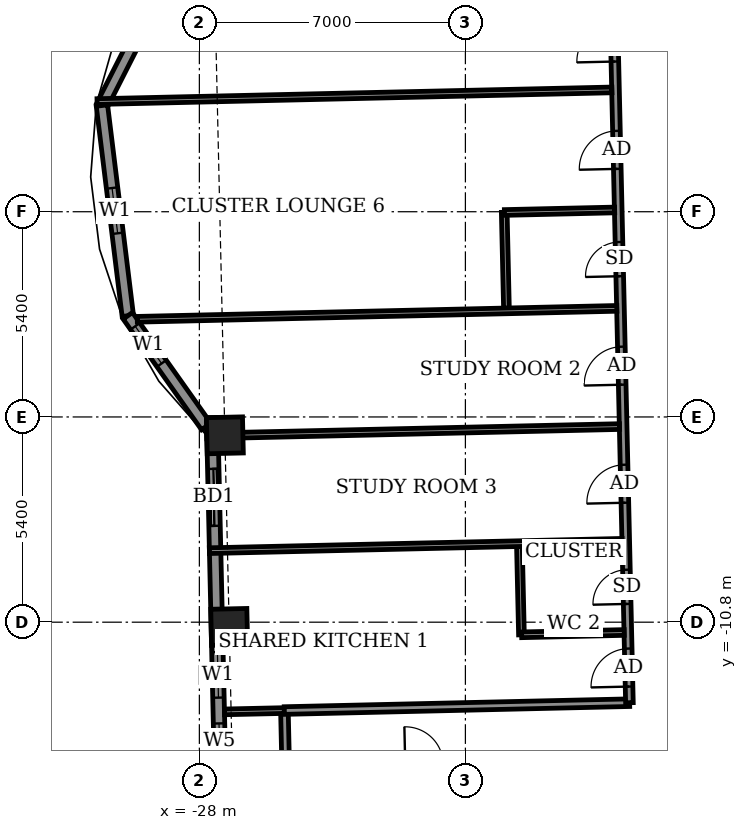
"""IFC4 building model, lengths in metres.
Left out: names, types, materials, properties, quantities, classifications, styles, units other than length and angle.
Written with IfcOpenShell. Run it as: python <this file> out.ifc"""

import sys

from ifc_helpers import new_model, si_unit, direction, frame, frame_2d, origin, origin_2d, place, context, subcontext, project, spatial, rectangle, extrude, element, fill, save


model = new_model("IFC4")
c1 = context("Model", 3, precision=1e-05, world=origin(), true_north=direction((0.0, 1.0)))
c2 = subcontext(c1, "Body", "Model", "MODEL_VIEW")
j1 = project(units=[si_unit("LENGTHUNIT", "METRE"), si_unit("PLANEANGLEUNIT", "RADIAN")], contexts=[c1])
p1 = place(None, origin())
s1 = spatial("IfcSite", under=j1, at=p1, CompositionType="ELEMENT")
p2 = place(p1, origin())
s2 = spatial("IfcBuilding", under=s1, at=p2, CompositionType="ELEMENT")
p3 = place(p2, frame((0.0, 0.0, 287.1)))
s3 = spatial("IfcBuildingStorey", under=s2, at=p3, CompositionType="ELEMENT", Elevation=287.1)
for number, where, z_axis, x_axis in (
    (1, (-27.329, -5.883, -0.55), (0.0, 0.0, 1.0), (0.023, -1.0, 0.0)),
    (2, (-27.215, -10.924, -0.55), (0.0, 0.0, 1.0), (0.023, -1.0, 0.0)),
):
    element("IfcColumn", number, at=place(p3, frame(where, z_axis=z_axis, x_axis=x_axis)), inside=s3, PredefinedType="COLUMN", context=c2, shape_type="SweptSolid", body=[
        extrude(rectangle(XDim=0.95, YDim=0.95, at=origin_2d()), origin(), (0.0, 0.0, 1.0), 3.6),
    ])
p4 = place(p3, frame((-28.12, 7.608, 0.0), z_axis=(0.0, 0.0, 1.0), x_axis=(-0.45266802131, -0.891679125293, 0.0)))
e3 = element("IfcWall", 3, at=p4, inside=s3, PredefinedType="SOLIDWALL", context=c2, shape_type="SweptSolid", body=[
    extrude(rectangle(XDim=5.399, YDim=0.3, at=frame_2d((2.699, 0.0))), origin(), (0.0, 0.0, 1.0), 3.05),
])
p5 = place(p4, frame((2.008, 0.0, 0.9)))
e4 = element("IfcOpeningElement", 4, at=p5, cuts=e3, PredefinedType="OPENING", context=c2, shape_type="SweptSolid", body=[
    extrude(rectangle(XDim=1.2, YDim=1.5, at=frame_2d((0.6, 0.75))), frame((0.0, 0.16, 0.0), z_axis=(0.0, -1.0, 0.0), x_axis=(1.0, 0.0, 0.0)), (0.0, 0.0, 1.0), 0.32),
])
p6 = place(p3, frame((-30.564, 2.794, 0.0), z_axis=(0.0, 0.0, 1.0), x_axis=(0.122163831021, -0.992509948761, 0.0)))
e5 = element("IfcWall", 5, at=p6, inside=s3, PredefinedType="SOLIDWALL", context=c2, shape_type="SweptSolid", body=[
    extrude(rectangle(XDim=5.574, YDim=0.3, at=frame_2d((2.787, 0.0))), origin(), (0.0, 0.0, 1.0), 3.05),
])
p7 = place(p6, frame((2.187, 0.0, 0.9)))
e6 = element("IfcOpeningElement", 6, at=p7, cuts=e5, PredefinedType="OPENING", context=c2, shape_type="SweptSolid", body=[
    extrude(rectangle(XDim=1.2, YDim=1.5, at=frame_2d((0.6, 0.75))), frame((0.0, 0.16, 0.0), z_axis=(0.0, -1.0, 0.0), x_axis=(1.0, 0.0, 0.0)), (0.0, 0.0, 1.0), 0.32),
])
p8 = place(p3, frame((-29.883, -2.738, 0.0), z_axis=(0.0, 0.0, 1.0), x_axis=(0.578095163598, -0.815969351033, 0.0)))
e7 = element("IfcWall", 7, at=p8, inside=s3, PredefinedType="SOLIDWALL", context=c2, shape_type="SweptSolid", body=[
    extrude(rectangle(XDim=3.569, YDim=0.3, at=frame_2d((1.784, 0.0))), origin(), (0.0, 0.0, 1.0), 3.05),
])
p9 = place(p8, frame((0.338, 0.0, 0.9)))
e8 = element("IfcOpeningElement", 8, at=p9, cuts=e7, PredefinedType="OPENING", context=c2, shape_type="SweptSolid", body=[
    extrude(rectangle(XDim=1.2, YDim=1.5, at=frame_2d((0.6, 0.75))), frame((0.0, 0.16, 0.0), z_axis=(0.0, -1.0, 0.0), x_axis=(1.0, 0.0, 0.0)), (0.0, 0.0, 1.0), 0.32),
])
p10 = place(p3, frame((-27.665, -5.416, 0.0), z_axis=(0.0, 0.0, 1.0), x_axis=(0.022660024814, -0.999743228672, 0.0)))
e9 = element("IfcWall", 9, at=p10, inside=s3, PredefinedType="SOLIDWALL", context=c2, shape_type="SweptSolid", body=[
    extrude(rectangle(XDim=15.45, YDim=0.3, at=frame_2d((7.725, 0.0))), origin(), (0.0, 0.0, 1.0), 2.55),
])
p11 = place(p10, frame((1.35, 0.0, 0.0)))
e10 = element("IfcOpeningElement", 10, at=p11, cuts=e9, PredefinedType="OPENING", context=c2, shape_type="SweptSolid", body=[
    extrude(rectangle(XDim=1.5, YDim=2.4, at=frame_2d((0.75, 1.2))), frame((0.0, 0.16, 0.0), z_axis=(0.0, -1.0, 0.0), x_axis=(1.0, 0.0, 0.0)), (0.0, 0.0, 1.0), 0.32),
])
p12 = place(p10, frame((6.171, 0.0, 0.9)))
e11 = element("IfcOpeningElement", 11, at=p12, cuts=e9, PredefinedType="OPENING", context=c2, shape_type="SweptSolid", body=[
    extrude(rectangle(XDim=1.2, YDim=1.5, at=frame_2d((0.6, 0.75))), frame((0.0, 0.16, 0.0), z_axis=(0.0, -1.0, 0.0), x_axis=(1.0, 0.0, 0.0)), (0.0, 0.0, 1.0), 0.32),
])
p13 = place(p10, frame((8.05, 0.0, 0.9)))
e12 = element("IfcOpeningElement", 12, at=p13, cuts=e9, PredefinedType="OPENING", context=c2, shape_type="SweptSolid", body=[
    extrude(rectangle(XDim=0.9, YDim=1.5, at=frame_2d((0.45, 0.75))), frame((0.0, 0.16, 0.0), z_axis=(0.0, -1.0, 0.0), x_axis=(1.0, 0.0, 0.0)), (0.0, 0.0, 1.0), 0.32),
])
p14 = place(p10, frame((11.625, 0.0, 0.9)))
e13 = element("IfcOpeningElement", 13, at=p14, cuts=e9, PredefinedType="OPENING", context=c2, shape_type="SweptSolid", body=[
    extrude(rectangle(XDim=2.4, YDim=1.5, at=frame_2d((1.2, 0.75))), frame((0.0, 0.16, 0.0), z_axis=(0.0, -1.0, 0.0), x_axis=(1.0, 0.0, 0.0)), (0.0, 0.0, 1.0), 0.32),
])
p15 = place(p3, frame((-25.731, -14.624, 0.0), z_axis=(0.0, 0.0, 1.0), x_axis=(0.999742799525, 0.022678950563, 0.0)))
e14 = element("IfcWall", 14, at=p15, inside=s3, PredefinedType="PARTITIONING", context=c2, shape_type="SweptSolid", body=[
    extrude(rectangle(XDim=55.386, YDim=0.2, at=frame_2d((27.693, 0.0))), origin(), (0.0, 0.0, 1.0), 3.05),
])
p16 = place(p15, frame((3.149, 0.0, 0.0)))
e15 = element("IfcOpeningElement", 15, at=p16, cuts=e14, PredefinedType="OPENING", context=c2, shape_type="SweptSolid", body=[
    extrude(rectangle(XDim=1.0, YDim=2.1, at=frame_2d((0.5, 1.05))), frame((0.0, 0.11, 0.0), z_axis=(0.0, -1.0, 0.0), x_axis=(1.0, 0.0, 0.0)), (0.0, 0.0, 1.0), 0.22),
])
p17 = place(p15, frame((11.1, 0.0, 0.0)))
e16 = element("IfcOpeningElement", 16, at=p17, cuts=e14, PredefinedType="OPENING", context=c2, shape_type="SweptSolid", body=[
    extrude(rectangle(XDim=0.9, YDim=2.1, at=frame_2d((0.45, 1.05))), frame((0.0, 0.11, 0.0), z_axis=(0.0, -1.0, 0.0), x_axis=(1.0, 0.0, 0.0)), (0.0, 0.0, 1.0), 0.22),
])
p18 = place(p15, frame((12.95, 0.0, 0.0)))
e17 = element("IfcOpeningElement", 17, at=p18, cuts=e14, PredefinedType="OPENING", context=c2, shape_type="SweptSolid", body=[
    extrude(rectangle(XDim=0.9, YDim=2.1, at=frame_2d((0.45, 1.05))), frame((0.0, 0.11, 0.0), z_axis=(0.0, -1.0, 0.0), x_axis=(1.0, 0.0, 0.0)), (0.0, 0.0, 1.0), 0.22),
])
p19 = place(p15, frame((19.675, 0.0, 0.0)))
e18 = element("IfcOpeningElement", 18, at=p19, cuts=e14, PredefinedType="OPENING", context=c2, shape_type="SweptSolid", body=[
    extrude(rectangle(XDim=0.9, YDim=2.1, at=frame_2d((0.45, 1.05))), frame((0.0, 0.11, 0.0), z_axis=(0.0, -1.0, 0.0), x_axis=(1.0, 0.0, 0.0)), (0.0, 0.0, 1.0), 0.22),
])
p20 = place(p15, frame((21.7, 0.0, 0.0)))
e19 = element("IfcOpeningElement", 19, at=p20, cuts=e14, PredefinedType="OPENING", context=c2, shape_type="SweptSolid", body=[
    extrude(rectangle(XDim=0.9, YDim=2.1, at=frame_2d((0.45, 1.05))), frame((0.0, 0.11, 0.0), z_axis=(0.0, -1.0, 0.0), x_axis=(1.0, 0.0, 0.0)), (0.0, 0.0, 1.0), 0.22),
])
p21 = place(p15, frame((28.475, 0.0, 0.0)))
e20 = element("IfcOpeningElement", 20, at=p21, cuts=e14, PredefinedType="OPENING", context=c2, shape_type="SweptSolid", body=[
    extrude(rectangle(XDim=0.9, YDim=2.1, at=frame_2d((0.45, 1.05))), frame((0.0, 0.11, 0.0), z_axis=(0.0, -1.0, 0.0), x_axis=(1.0, 0.0, 0.0)), (0.0, 0.0, 1.0), 0.22),
])
p22 = place(p15, frame((30.45, 0.0, 0.0)))
e21 = element("IfcOpeningElement", 21, at=p22, cuts=e14, PredefinedType="OPENING", context=c2, shape_type="SweptSolid", body=[
    extrude(rectangle(XDim=0.9, YDim=2.1, at=frame_2d((0.45, 1.05))), frame((0.0, 0.11, 0.0), z_axis=(0.0, -1.0, 0.0), x_axis=(1.0, 0.0, 0.0)), (0.0, 0.0, 1.0), 0.22),
])
p23 = place(p15, frame((37.25, 0.0, 0.0)))
e22 = element("IfcOpeningElement", 22, at=p23, cuts=e14, PredefinedType="OPENING", context=c2, shape_type="SweptSolid", body=[
    extrude(rectangle(XDim=0.9, YDim=2.1, at=frame_2d((0.45, 1.05))), frame((0.0, 0.11, 0.0), z_axis=(0.0, -1.0, 0.0), x_axis=(1.0, 0.0, 0.0)), (0.0, 0.0, 1.0), 0.22),
])
p24 = place(p15, frame((39.175, 0.0, 0.0)))
e23 = element("IfcOpeningElement", 23, at=p24, cuts=e14, PredefinedType="OPENING", context=c2, shape_type="SweptSolid", body=[
    extrude(rectangle(XDim=0.9, YDim=2.1, at=frame_2d((0.45, 1.05))), frame((0.0, 0.11, 0.0), z_axis=(0.0, -1.0, 0.0), x_axis=(1.0, 0.0, 0.0)), (0.0, 0.0, 1.0), 0.22),
])
p25 = place(p15, frame((45.875, 0.0, 0.0)))
e24 = element("IfcOpeningElement", 24, at=p25, cuts=e14, PredefinedType="OPENING", context=c2, shape_type="SweptSolid", body=[
    extrude(rectangle(XDim=0.9, YDim=2.1, at=frame_2d((0.45, 1.05))), frame((0.0, 0.11, 0.0), z_axis=(0.0, -1.0, 0.0), x_axis=(1.0, 0.0, 0.0)), (0.0, 0.0, 1.0), 0.22),
])
p26 = place(p15, frame((51.127, 0.0, 0.0)))
e25 = element("IfcOpeningElement", 25, at=p26, cuts=e14, PredefinedType="OPENING", context=c2, shape_type="SweptSolid", body=[
    extrude(rectangle(XDim=1.0, YDim=2.1, at=frame_2d((0.5, 1.05))), frame((0.0, 0.11, 0.0), z_axis=(0.0, -1.0, 0.0), x_axis=(1.0, 0.0, 0.0)), (0.0, 0.0, 1.0), 0.22),
])
p27 = place(p3, frame((-25.728, -14.624, 0.0), z_axis=(0.0, 0.0, 1.0), x_axis=(-0.022632637625, 0.99974384905, 0.0)))
e26 = element("IfcWall", 26, at=p27, inside=s3, PredefinedType="PARTITIONING", context=c2, shape_type="SweptSolid", body=[
    extrude(rectangle(XDim=1.5, YDim=0.2, at=frame_2d((0.75, 0.0))), origin(), (0.0, 0.0, 1.0), 3.05),
])
p28 = place(p3, frame((-27.339, -13.16, 0.0), z_axis=(0.0, 0.0, 1.0), x_axis=(0.999754171712, 0.022171967518, 0.0)))
e27 = element("IfcWall", 27, at=p28, inside=s3, PredefinedType="PARTITIONING", context=c2, shape_type="SweptSolid", body=[
    extrude(rectangle(XDim=1.575, YDim=0.15, at=frame_2d((0.787, 0.0))), origin(), (0.0, 0.0, 1.0), 2.55),
])
p29 = place(p3, frame((-25.765, -13.125, 0.0), z_axis=(0.0, 0.0, 1.0), x_axis=(0.999740502457, 0.022779985654, 0.0)))
e28 = element("IfcWall", 28, at=p29, inside=s3, PredefinedType="PARTITIONING", context=c2, shape_type="SweptSolid", body=[
    extrude(rectangle(XDim=9.088, YDim=0.2, at=frame_2d((4.544, 0.0))), origin(), (0.0, 0.0, 1.0), 3.05),
])
p30 = place(p3, frame((-16.684, -12.919, 0.0), z_axis=(0.0, 0.0, 1.0), x_axis=(-0.022712214871, 0.999742044377, 0.0)))
e29 = element("IfcWall", 29, at=p30, inside=s3, PredefinedType="PARTITIONING", context=c2, shape_type="SweptSolid", body=[
    extrude(rectangle(XDim=26.551, YDim=0.2, at=frame_2d((13.275, 0.0))), origin(), (0.0, 0.0, 1.0), 3.05),
])
p31 = place(p30, frame((24.688, 0.0, 0.0)))
e30 = element("IfcOpeningElement", 30, at=p31, cuts=e29, PredefinedType="OPENING", context=c2, shape_type="SweptSolid", body=[
    extrude(rectangle(XDim=1.0, YDim=2.1, at=frame_2d((0.5, 1.05))), frame((0.0, 0.11, 0.0), z_axis=(0.0, -1.0, 0.0), x_axis=(1.0, 0.0, 0.0)), (0.0, 0.0, 1.0), 0.22),
])
p32 = place(p30, frame((21.975, 0.0, 0.0)))
e31 = element("IfcOpeningElement", 31, at=p32, cuts=e29, PredefinedType="OPENING", context=c2, shape_type="SweptSolid", body=[
    extrude(rectangle(XDim=0.9, YDim=2.1, at=frame_2d((0.45, 1.05))), frame((0.0, 0.11, 0.0), z_axis=(0.0, -1.0, 0.0), x_axis=(1.0, 0.0, 0.0)), (0.0, 0.0, 1.0), 0.22),
])
p33 = place(p30, frame((16.875, 0.0, 0.0)))
e32 = element("IfcOpeningElement", 32, at=p33, cuts=e29, PredefinedType="OPENING", context=c2, shape_type="SweptSolid", body=[
    extrude(rectangle(XDim=1.0, YDim=2.1, at=frame_2d((0.5, 1.05))), frame((0.0, 0.11, 0.0), z_axis=(0.0, -1.0, 0.0), x_axis=(1.0, 0.0, 0.0)), (0.0, 0.0, 1.0), 0.22),
])
p34 = place(p30, frame((19.375, 0.0, 0.0)))
e33 = element("IfcOpeningElement", 33, at=p34, cuts=e29, PredefinedType="OPENING", context=c2, shape_type="SweptSolid", body=[
    extrude(rectangle(XDim=0.9, YDim=2.1, at=frame_2d((0.45, 1.05))), frame((0.0, 0.11, 0.0), z_axis=(0.0, -1.0, 0.0), x_axis=(1.0, 0.0, 0.0)), (0.0, 0.0, 1.0), 0.22),
])
p35 = place(p30, frame((14.05, 0.0, 0.0)))
e34 = element("IfcOpeningElement", 34, at=p35, cuts=e29, PredefinedType="OPENING", context=c2, shape_type="SweptSolid", body=[
    extrude(rectangle(XDim=1.0, YDim=2.1, at=frame_2d((0.5, 1.05))), frame((0.0, 0.11, 0.0), z_axis=(0.0, -1.0, 0.0), x_axis=(1.0, 0.0, 0.0)), (0.0, 0.0, 1.0), 0.22),
])
p36 = place(p30, frame((11.225, 0.0, 0.0)))
e35 = element("IfcOpeningElement", 35, at=p36, cuts=e29, PredefinedType="OPENING", context=c2, shape_type="SweptSolid", body=[
    extrude(rectangle(XDim=0.9, YDim=2.1, at=frame_2d((0.45, 1.05))), frame((0.0, 0.11, 0.0), z_axis=(0.0, -1.0, 0.0), x_axis=(1.0, 0.0, 0.0)), (0.0, 0.0, 1.0), 0.22),
])
p37 = place(p30, frame((8.37, 0.0, 0.0)))
e36 = element("IfcOpeningElement", 36, at=p37, cuts=e29, PredefinedType="OPENING", context=c2, shape_type="SweptSolid", body=[
    extrude(rectangle(XDim=1.0, YDim=2.1, at=frame_2d((0.5, 1.05))), frame((0.0, 0.11, 0.0), z_axis=(0.0, -1.0, 0.0), x_axis=(1.0, 0.0, 0.0)), (0.0, 0.0, 1.0), 0.22),
])
p38 = place(p30, frame((5.263, 0.0, 0.0)))
e37 = element("IfcOpeningElement", 37, at=p38, cuts=e29, PredefinedType="OPENING", context=c2, shape_type="SweptSolid", body=[
    extrude(rectangle(XDim=1.0, YDim=2.1, at=frame_2d((0.5, 1.05))), frame((0.0, 0.11, 0.0), z_axis=(0.0, -1.0, 0.0), x_axis=(1.0, 0.0, 0.0)), (0.0, 0.0, 1.0), 0.22),
])
p39 = place(p30, frame((0.425, 0.0, 0.0)))
e38 = element("IfcOpeningElement", 38, at=p39, cuts=e29, PredefinedType="OPENING", context=c2, shape_type="SweptSolid", body=[
    extrude(rectangle(XDim=1.0, YDim=2.1, at=frame_2d((0.5, 1.05))), frame((0.0, 0.11, 0.0), z_axis=(0.0, -1.0, 0.0), x_axis=(1.0, 0.0, 0.0)), (0.0, 0.0, 1.0), 0.22),
])
p40 = place(p30, frame((2.6, 0.0, 0.0)))
e39 = element("IfcOpeningElement", 39, at=p40, cuts=e29, PredefinedType="OPENING", context=c2, shape_type="SweptSolid", body=[
    extrude(rectangle(XDim=0.9, YDim=2.1, at=frame_2d((0.45, 1.05))), frame((0.0, 0.11, 0.0), z_axis=(0.0, -1.0, 0.0), x_axis=(1.0, 0.0, 0.0)), (0.0, 0.0, 1.0), 0.22),
])
p41 = place(p3, frame((-19.525, -11.133, 0.0), z_axis=(0.0, 0.0, 1.0), x_axis=(-0.022781023197, 0.999740478815, 0.0)))
e40 = element("IfcWall", 40, at=p41, inside=s3, PredefinedType="PARTITIONING", context=c2, shape_type="SweptSolid", body=[
    extrude(rectangle(XDim=2.325, YDim=0.15, at=frame_2d((1.163, 0.0))), origin(), (0.0, 0.0, 1.0), 3.05),
])
p42 = place(p3, frame((-19.52, -11.132, 0.0), z_axis=(0.0, 0.0, 1.0), x_axis=(0.999744396973, 0.02260842146, 0.0)))
e41 = element("IfcWall", 41, at=p42, inside=s3, PredefinedType="PARTITIONING", context=c2, shape_type="SweptSolid", body=[
    extrude(rectangle(XDim=2.7, YDim=0.15, at=frame_2d((1.35, 0.0))), origin(), (0.0, 0.0, 1.0), 3.05),
])
p43 = place(p3, frame((-27.736, -8.918, 0.0), z_axis=(0.0, 0.0, 1.0), x_axis=(0.999743862053, 0.02263206324, 0.0)))
e42 = element("IfcWall", 42, at=p43, inside=s3, PredefinedType="PARTITIONING", context=c2, shape_type="SweptSolid", body=[
    extrude(rectangle(XDim=10.863, YDim=0.15, at=frame_2d((5.431, 0.0))), origin(), (0.0, 0.0, 1.0), 2.55),
])
p44 = place(p3, frame((-27.804, -5.899, 0.0), z_axis=(0.0, 0.0, 1.0), x_axis=(0.999743850541, 0.02263257177, 0.0)))
e43 = element("IfcWall", 43, at=p44, inside=s3, PredefinedType="PARTITIONING", context=c2, shape_type="SweptSolid", body=[
    extrude(rectangle(XDim=10.863, YDim=0.15, at=frame_2d((5.431, 0.0))), origin(), (0.0, 0.0, 1.0), 3.05),
])
p45 = place(p3, frame((-19.92, -2.539, 0.0), z_axis=(0.0, 0.0, 1.0), x_axis=(-0.023013537724, 0.999735153469, 0.0)))
e44 = element("IfcWall", 44, at=p45, inside=s3, PredefinedType="PARTITIONING", context=c2, shape_type="SweptSolid", body=[
    extrude(rectangle(XDim=2.525, YDim=0.15, at=frame_2d((1.262, 0.0))), origin(), (0.0, 0.0, 1.0), 3.05),
])
p46 = place(p3, frame((-29.634, -2.83, 0.0), z_axis=(0.0, 0.0, 1.0), x_axis=(0.999741276056, 0.022746009531, 0.0)))
e45 = element("IfcWall", 45, at=p46, inside=s3, PredefinedType="PARTITIONING", context=c2, shape_type="SweptSolid", body=[
    extrude(rectangle(XDim=12.622, YDim=0.15, at=frame_2d((6.311, 0.0))), origin(), (0.0, 0.0, 1.0), 2.1),
])
p47 = place(p3, frame((-19.973, -0.02, 0.0), z_axis=(0.0, 0.0, 1.0), x_axis=(0.999741748633, 0.022725229174, 0.0)))
e46 = element("IfcWall", 46, at=p47, inside=s3, PredefinedType="PARTITIONING", context=c2, shape_type="SweptSolid", body=[
    extrude(rectangle(XDim=2.901, YDim=0.15, at=frame_2d((1.45, 0.0))), origin(), (0.0, 0.0, 1.0), 3.05),
])
p48 = place(p3, frame((-30.692, 2.898, 0.0), z_axis=(0.0, 0.0, 1.0), x_axis=(0.999743099019, 0.022665744279, 0.0)))
e47 = element("IfcWall", 47, at=p48, inside=s3, PredefinedType="PARTITIONING", context=c2, shape_type="SweptSolid", body=[
    extrude(rectangle(XDim=13.55, YDim=0.15, at=frame_2d((6.775, 0.0))), origin(), (0.0, 0.0, 1.0), 2.1),
])
p49 = place(p7, origin())
e48 = element("IfcWindow", 48, at=p49, inside=s3, PartitioningType="SINGLE_PANEL", PredefinedType="WINDOW", context=c2, shape_type="SweptSolid", body=[
    extrude(rectangle(XDim=1.2, YDim=1.5, at=frame_2d((0.6, 0.75))), frame((0.0, 0.03, 0.0), z_axis=(0.0, -1.0, 0.0), x_axis=(1.0, 0.0, 0.0)), (0.0, 0.0, 1.0), 0.06),
])
fill(e6, e48)
p50 = place(p9, origin())
e49 = element("IfcWindow", 49, at=p50, inside=s3, PartitioningType="SINGLE_PANEL", PredefinedType="WINDOW", context=c2, shape_type="SweptSolid", body=[
    extrude(rectangle(XDim=1.2, YDim=1.5, at=frame_2d((0.6, 0.75))), frame((0.0, 0.03, 0.0), z_axis=(0.0, -1.0, 0.0), x_axis=(1.0, 0.0, 0.0)), (0.0, 0.0, 1.0), 0.06),
])
fill(e8, e49)
p51 = place(p11, origin())
e50 = element("IfcDoor", 50, at=p51, inside=s3, OperationType="SLIDING_TO_LEFT", PredefinedType="DOOR", context=c2, shape_type="SweptSolid", body=[
    extrude(rectangle(XDim=1.5, YDim=2.4, at=frame_2d((0.75, 1.2))), frame((0.0, 0.025, 0.0), z_axis=(0.0, -1.0, 0.0), x_axis=(1.0, 0.0, 0.0)), (0.0, 0.0, 1.0), 0.05),
])
fill(e10, e50)
p52 = place(p12, origin())
e51 = element("IfcWindow", 51, at=p52, inside=s3, PartitioningType="SINGLE_PANEL", PredefinedType="WINDOW", context=c2, shape_type="SweptSolid", body=[
    extrude(rectangle(XDim=1.2, YDim=1.5, at=frame_2d((0.6, 0.75))), frame((0.0, 0.03, 0.0), z_axis=(0.0, -1.0, 0.0), x_axis=(1.0, 0.0, 0.0)), (0.0, 0.0, 1.0), 0.06),
])
fill(e11, e51)
p53 = place(p13, origin())
e52 = element("IfcWindow", 52, at=p53, inside=s3, PartitioningType="SINGLE_PANEL", PredefinedType="WINDOW", context=c2, shape_type="SweptSolid", body=[
    extrude(rectangle(XDim=0.9, YDim=1.5, at=frame_2d((0.45, 0.75))), frame((0.0, 0.03, 0.0), z_axis=(0.0, -1.0, 0.0), x_axis=(1.0, 0.0, 0.0)), (0.0, 0.0, 1.0), 0.06),
])
fill(e12, e52)
p54 = place(p33, origin())
e53 = element("IfcDoor", 53, at=p54, inside=s3, OperationType="SINGLE_SWING_RIGHT", PredefinedType="DOOR", context=c2, shape_type="SweptSolid", body=[
    extrude(rectangle(XDim=1.0, YDim=2.1, at=frame_2d((0.5, 1.05))), frame((0.0, 0.025, 0.0), z_axis=(0.0, -1.0, 0.0), x_axis=(1.0, 0.0, 0.0)), (0.0, 0.0, 1.0), 0.05),
])
fill(e32, e53)
p55 = place(p35, origin())
e54 = element("IfcDoor", 54, at=p55, inside=s3, OperationType="SINGLE_SWING_LEFT", PredefinedType="DOOR", context=c2, shape_type="SweptSolid", body=[
    extrude(rectangle(XDim=1.0, YDim=2.1, at=frame_2d((0.5, 1.05))), frame((0.0, 0.025, 0.0), z_axis=(0.0, -1.0, 0.0), x_axis=(1.0, 0.0, 0.0)), (0.0, 0.0, 1.0), 0.05),
])
fill(e34, e54)
p56 = place(p36, origin())
e55 = element("IfcDoor", 55, at=p56, inside=s3, OperationType="SINGLE_SWING_RIGHT", PredefinedType="DOOR", context=c2, shape_type="SweptSolid", body=[
    extrude(rectangle(XDim=0.9, YDim=2.1, at=frame_2d((0.45, 1.05))), frame((0.0, 0.025, 0.0), z_axis=(0.0, -1.0, 0.0), x_axis=(1.0, 0.0, 0.0)), (0.0, 0.0, 1.0), 0.05),
])
fill(e35, e55)
p57 = place(p37, origin())
e56 = element("IfcDoor", 56, at=p57, inside=s3, OperationType="SINGLE_SWING_RIGHT", PredefinedType="DOOR", context=c2, shape_type="SweptSolid", body=[
    extrude(rectangle(XDim=1.0, YDim=2.1, at=frame_2d((0.5, 1.05))), frame((0.0, 0.025, 0.0), z_axis=(0.0, -1.0, 0.0), x_axis=(1.0, 0.0, 0.0)), (0.0, 0.0, 1.0), 0.05),
])
fill(e36, e56)
p58 = place(p38, origin())
e57 = element("IfcDoor", 57, at=p58, inside=s3, OperationType="SINGLE_SWING_LEFT", PredefinedType="DOOR", context=c2, shape_type="SweptSolid", body=[
    extrude(rectangle(XDim=1.0, YDim=2.1, at=frame_2d((0.5, 1.05))), frame((0.0, 0.025, 0.0), z_axis=(0.0, -1.0, 0.0), x_axis=(1.0, 0.0, 0.0)), (0.0, 0.0, 1.0), 0.05),
])
fill(e37, e57)
p59 = place(p39, origin())
e58 = element("IfcDoor", 58, at=p59, inside=s3, OperationType="SINGLE_SWING_RIGHT", PredefinedType="DOOR", context=c2, shape_type="SweptSolid", body=[
    extrude(rectangle(XDim=1.0, YDim=2.1, at=frame_2d((0.5, 1.05))), frame((0.0, 0.025, 0.0), z_axis=(0.0, -1.0, 0.0), x_axis=(1.0, 0.0, 0.0)), (0.0, 0.0, 1.0), 0.05),
])
fill(e38, e58)
p60 = place(p40, origin())
e59 = element("IfcDoor", 59, at=p60, inside=s3, OperationType="SINGLE_SWING_LEFT", PredefinedType="DOOR", context=c2, shape_type="SweptSolid", body=[
    extrude(rectangle(XDim=0.9, YDim=2.1, at=frame_2d((0.45, 1.05))), frame((0.0, 0.025, 0.0), z_axis=(0.0, -1.0, 0.0), x_axis=(1.0, 0.0, 0.0)), (0.0, 0.0, 1.0), 0.05),
])
fill(e39, e59)
save(model, sys.argv[1])
